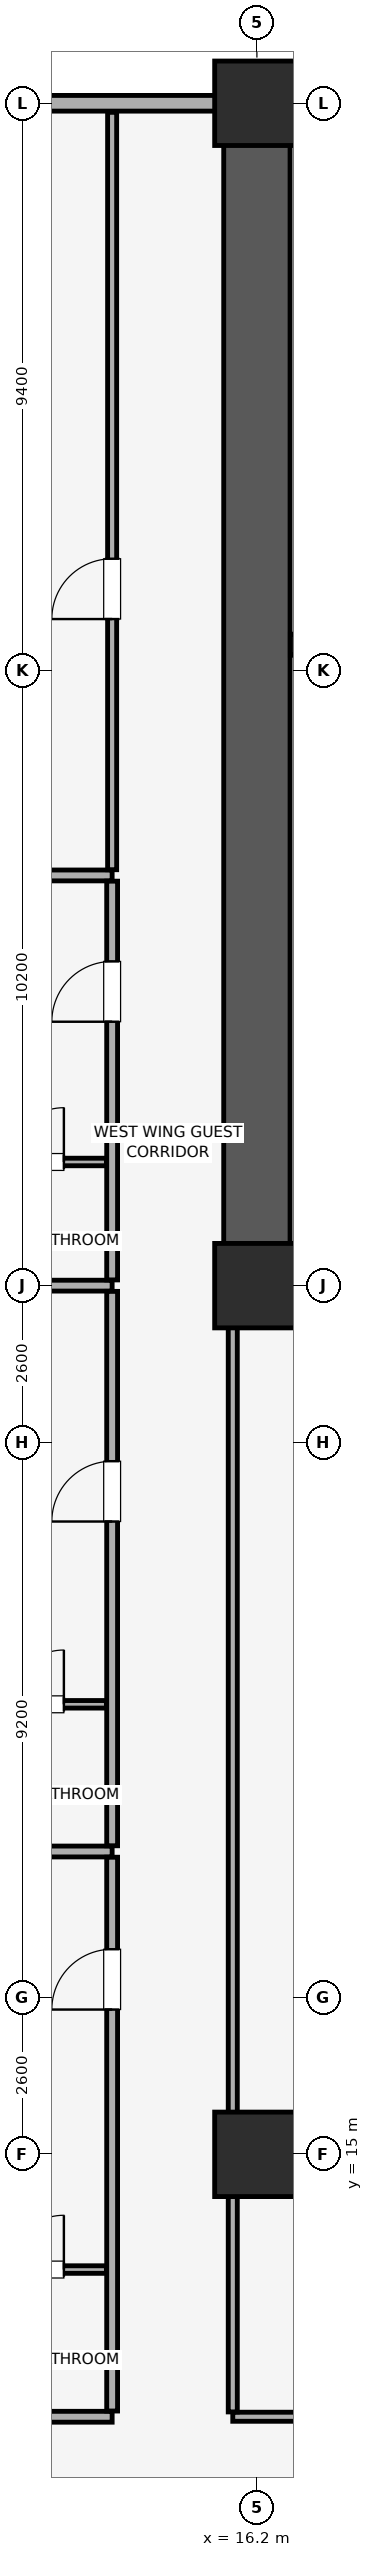
"""IFC4 building model, lengths in metres.
Left out: names, types, materials, properties, quantities, classifications, styles, units other than length and angle.
Written with IfcOpenShell. Run it as: python <this file> out.ifc"""

import sys

from ifc_helpers import new_model, si_unit, direction, frame, frame_2d, origin, origin_2d, place, context, subcontext, project, spatial, rectangle, extrude, element, fill, save


model = new_model("IFC4")
c1 = context("Model", 3, precision=1e-05, world=origin(), true_north=direction((0.0, 1.0)))
c2 = subcontext(c1, "Body", "Model", "MODEL_VIEW")
j1 = project(units=[si_unit("LENGTHUNIT", "METRE"), si_unit("PLANEANGLEUNIT", "RADIAN")], contexts=[c1])
p1 = place(None, origin())
s1 = spatial("IfcSite", under=j1, at=p1, CompositionType="ELEMENT")
p2 = place(p1, origin())
s2 = spatial("IfcBuilding", under=s1, at=p2, CompositionType="ELEMENT")
p3 = place(p2, frame((0.0, 0.0, 35.15)))
s3 = spatial("IfcBuildingStorey", under=s2, at=p3, CompositionType="ELEMENT", Elevation=35.15)
for number, where, z_axis, x_axis in (
    (1, (16.2, 15.0, 0.0), (0.0, 0.0, 1.0), (1.0, 0.0, 0.0)),
    (2, (16.2, 29.4, 0.0), (0.0, 0.0, 1.0), (1.0, 0.0, 0.0)),
    (3, (16.2, 49.0, 0.0), (0.0, 0.0, 1.0), (1.0, 0.0, 0.0)),
):
    element("IfcColumn", number, at=place(p3, frame(where, z_axis=z_axis, x_axis=x_axis)), inside=s3, PredefinedType="COLUMN", context=c2, shape_type="SweptSolid", body=[
        extrude(rectangle(XDim=1.4, YDim=1.4, at=origin_2d()), origin(), (0.0, 0.0, 1.0), 3.51),
    ])
p4 = place(p3, frame((79.8, 49.0, 0.0), z_axis=(0.0, 0.0, 1.0), x_axis=(-1.0, 0.0, 0.0)))
e4 = element("IfcWall", 4, at=p4, inside=s3, PredefinedType="SOLIDWALL", context=c2, shape_type="SweptSolid", body=[
    extrude(rectangle(XDim=75.6, YDim=0.26, at=frame_2d((37.8, 0.0))), origin(), (0.0, 0.0, 1.0), 2.56),
])
p5 = place(p4, frame((72.565, 0.0, 0.85)))
e5 = element("IfcOpeningElement", 5, at=p5, cuts=e4, PredefinedType="OPENING", context=c2, shape_type="SweptSolid", body=[
    extrude(rectangle(XDim=1.5, YDim=1.4, at=frame_2d((0.75, 0.7))), frame((0.0, 0.14, 0.0), z_axis=(0.0, -1.0, 0.0), x_axis=(1.0, 0.0, 0.0)), (0.0, 0.0, 1.0), 0.28),
])
p6 = place(p4, frame((67.45, 0.0, 0.85)))
e6 = element("IfcOpeningElement", 6, at=p6, cuts=e4, PredefinedType="OPENING", context=c2, shape_type="SweptSolid", body=[
    extrude(rectangle(XDim=1.5, YDim=1.4, at=frame_2d((0.75, 0.7))), frame((0.0, 0.14, 0.0), z_axis=(0.0, -1.0, 0.0), x_axis=(1.0, 0.0, 0.0)), (0.0, 0.0, 1.0), 0.28),
])
p7 = place(p4, frame((6.65, 0.0, 0.85)))
e7 = element("IfcOpeningElement", 7, at=p7, cuts=e4, PredefinedType="OPENING", context=c2, shape_type="SweptSolid", body=[
    extrude(rectangle(XDim=1.5, YDim=1.4, at=frame_2d((0.75, 0.7))), frame((0.0, 0.14, 0.0), z_axis=(0.0, -1.0, 0.0), x_axis=(1.0, 0.0, 0.0)), (0.0, 0.0, 1.0), 0.28),
])
p8 = place(p4, frame((1.535, 0.0, 0.85)))
e8 = element("IfcOpeningElement", 8, at=p8, cuts=e4, PredefinedType="OPENING", context=c2, shape_type="SweptSolid", body=[
    extrude(rectangle(XDim=1.5, YDim=1.4, at=frame_2d((0.75, 0.7))), frame((0.0, 0.14, 0.0), z_axis=(0.0, -1.0, 0.0), x_axis=(1.0, 0.0, 0.0)), (0.0, 0.0, 1.0), 0.28),
])
p9 = place(p4, frame((51.365, 0.0, 0.9)))
e9 = element("IfcOpeningElement", 9, at=p9, cuts=e4, PredefinedType="OPENING", context=c2, shape_type="SweptSolid", body=[
    extrude(rectangle(XDim=1.5, YDim=1.4, at=frame_2d((0.75, 0.7))), frame((0.0, 0.14, 0.0), z_axis=(0.0, -1.0, 0.0), x_axis=(1.0, 0.0, 0.0)), (0.0, 0.0, 1.0), 0.28),
])
p10 = place(p4, frame((46.0, 0.0, 0.9)))
e10 = element("IfcOpeningElement", 10, at=p10, cuts=e4, PredefinedType="OPENING", context=c2, shape_type="SweptSolid", body=[
    extrude(rectangle(XDim=1.5, YDim=1.4, at=frame_2d((0.75, 0.7))), frame((0.0, 0.14, 0.0), z_axis=(0.0, -1.0, 0.0), x_axis=(1.0, 0.0, 0.0)), (0.0, 0.0, 1.0), 0.28),
])
p11 = place(p4, frame((29.15, 0.0, 0.9)))
e11 = element("IfcOpeningElement", 11, at=p11, cuts=e4, PredefinedType="OPENING", context=c2, shape_type="SweptSolid", body=[
    extrude(rectangle(XDim=1.5, YDim=1.4, at=frame_2d((0.75, 0.7))), frame((0.0, 0.14, 0.0), z_axis=(0.0, -1.0, 0.0), x_axis=(1.0, 0.0, 0.0)), (0.0, 0.0, 1.0), 0.28),
])
p12 = place(p4, frame((23.485, 0.0, 0.9)))
e12 = element("IfcOpeningElement", 12, at=p12, cuts=e4, PredefinedType="OPENING", context=c2, shape_type="SweptSolid", body=[
    extrude(rectangle(XDim=1.5, YDim=1.4, at=frame_2d((0.75, 0.7))), frame((0.0, 0.14, 0.0), z_axis=(0.0, -1.0, 0.0), x_axis=(1.0, 0.0, 0.0)), (0.0, 0.0, 1.0), 0.28),
])
p13 = place(p3, frame((16.2, 29.4, 0.0), z_axis=(0.0, 0.0, 1.0), x_axis=(0.0, 1.0, 0.0)))
e13 = element("IfcWall", 13, at=p13, inside=s3, PredefinedType="SHEAR", context=c2, shape_type="SweptSolid", body=[
    extrude(rectangle(XDim=19.2, YDim=1.1, at=frame_2d((9.6, 0.0))), origin(), (0.0, 0.0, 1.0), 3.51),
])
p14 = place(p3, frame((16.755, 29.4, 0.0), z_axis=(0.0, 0.0, 1.0), x_axis=(1.0, 0.0, 0.0)))
e14 = element("IfcWall", 14, at=p14, inside=s3, PredefinedType="SHEAR", context=c2, shape_type="SweptSolid", body=[
    extrude(rectangle(XDim=6.845, YDim=1.1, at=frame_2d((3.423, 0.0))), origin(), (0.0, 0.0, 1.0), 3.51),
])
p15 = place(p3, frame((16.755, 40.025, 0.0), z_axis=(0.0, 0.0, 1.0), x_axis=(1.0, 0.0, 0.0)))
e15 = element("IfcWall", 15, at=p15, inside=s3, PredefinedType="SHEAR", context=c2, shape_type="SweptSolid", body=[
    extrude(rectangle(XDim=4.1, YDim=0.35, at=frame_2d((2.05, 0.0))), origin(), (0.0, 0.0, 1.0), 3.51),
])
p16 = place(p15, frame((1.71, 0.0, 0.0)))
e16 = element("IfcOpeningElement", 16, at=p16, cuts=e15, PredefinedType="OPENING", context=c2, shape_type="SweptSolid", body=[
    extrude(rectangle(XDim=1.15, YDim=2.15, at=frame_2d((0.575, 1.075))), frame((0.0, 0.185, 0.0), z_axis=(0.0, -1.0, 0.0), x_axis=(1.0, 0.0, 0.0)), (0.0, 0.0, 1.0), 0.37),
])
p17 = place(p3, frame((15.8, 10.65, 0.0), z_axis=(0.0, 0.0, 1.0), x_axis=(1.0, 0.0, 0.0)))
e17 = element("IfcWall", 17, at=p17, inside=s3, PredefinedType="PARTITIONING", context=c2, shape_type="SweptSolid", body=[
    extrude(rectangle(XDim=9.4, YDim=0.15, at=frame_2d((4.7, 0.0))), origin(), (0.0, 0.0, 1.0), 3.51),
])
p18 = place(p17, frame((4.2, 0.0, 0.0)))
e18 = element("IfcOpeningElement", 18, at=p18, cuts=e17, PredefinedType="OPENING", context=c2, shape_type="SweptSolid", body=[
    extrude(rectangle(XDim=1.0, YDim=2.15, at=frame_2d((0.5, 1.075))), frame((0.0, 0.085, 0.0), z_axis=(0.0, -1.0, 0.0), x_axis=(1.0, 0.0, 0.0)), (0.0, 0.0, 1.0), 0.17),
])
p19 = place(p3, frame((15.8, 10.73, 0.0), z_axis=(0.0, 0.0, 1.0), x_axis=(0.0, 1.0, 0.0)))
e19 = element("IfcWall", 19, at=p19, inside=s3, PredefinedType="PARTITIONING", context=c2, shape_type="SweptSolid", body=[
    extrude(rectangle(XDim=18.66, YDim=0.15, at=frame_2d((9.33, 0.0))), origin(), (0.0, 0.0, 1.0), 3.51),
])
for number, where, z_axis, x_axis in (
    (20, (0.15, 10.65, 0.0), (0.0, 0.0, 1.0), (1.0, 0.0, 0.0)),
    (21, (0.15, 20.02, 0.0), (0.0, 0.0, 1.0), (1.0, 0.0, 0.0)),
):
    element("IfcWall", number, at=place(p3, frame(where, z_axis=z_axis, x_axis=x_axis)), inside=s3, PredefinedType="PARTITIONING", context=c2, shape_type="SweptSolid", body=[
        extrude(rectangle(XDim=13.65, YDim=0.18, at=frame_2d((6.825, 0.0))), origin(), (0.0, 0.0, 1.0), 3.51),
    ])
p20 = place(p3, frame((13.8, 10.745, 0.0), z_axis=(0.0, 0.0, 1.0), x_axis=(0.0, 1.0, 0.0)))
e22 = element("IfcWall", 22, at=p20, inside=s3, PredefinedType="PARTITIONING", context=c2, shape_type="SweptSolid", body=[
    extrude(rectangle(XDim=9.18, YDim=0.18, at=frame_2d((4.59, 0.0))), origin(), (0.0, 0.0, 1.0), 3.51),
])
p21 = place(p20, frame((6.655, 0.0, 0.0)))
e23 = element("IfcOpeningElement", 23, at=p21, cuts=e22, PredefinedType="OPENING", context=c2, shape_type="SweptSolid", body=[
    extrude(rectangle(XDim=1.0, YDim=2.15, at=frame_2d((0.5, 1.075))), frame((0.0, 0.1, 0.0), z_axis=(0.0, -1.0, 0.0), x_axis=(1.0, 0.0, 0.0)), (0.0, 0.0, 1.0), 0.2),
])
p22 = place(p3, frame((11.3, 13.09, 0.0), z_axis=(0.0, 0.0, 1.0), x_axis=(1.0, 0.0, 0.0)))
e24 = element("IfcWall", 24, at=p22, inside=s3, PredefinedType="PARTITIONING", context=c2, shape_type="SweptSolid", body=[
    extrude(rectangle(XDim=2.405, YDim=0.125, at=frame_2d((1.203, 0.0))), origin(), (0.0, 0.0, 1.0), 3.51),
])
p23 = place(p22, frame((0.8, 0.0, 0.0)))
e25 = element("IfcOpeningElement", 25, at=p23, cuts=e24, PredefinedType="OPENING", context=c2, shape_type="SweptSolid", body=[
    extrude(rectangle(XDim=0.9, YDim=2.1, at=frame_2d((0.45, 1.05))), frame((0.0, 0.073, 0.0), z_axis=(0.0, -1.0, 0.0), x_axis=(1.0, 0.0, 0.0)), (0.0, 0.0, 1.0), 0.145),
])
p24 = place(p3, frame((0.15, 29.4, 0.0), z_axis=(0.0, 0.0, 1.0), x_axis=(1.0, 0.0, 0.0)))
e26 = element("IfcWall", 26, at=p24, inside=s3, PredefinedType="PARTITIONING", context=c2, shape_type="SweptSolid", body=[
    extrude(rectangle(XDim=13.65, YDim=0.18, at=frame_2d((6.825, 0.0))), origin(), (0.0, 0.0, 1.0), 2.86),
])
p25 = place(p3, frame((13.8, 20.115, 0.0), z_axis=(0.0, 0.0, 1.0), x_axis=(0.0, 1.0, 0.0)))
e27 = element("IfcWall", 27, at=p25, inside=s3, PredefinedType="PARTITIONING", context=c2, shape_type="SweptSolid", body=[
    extrude(rectangle(XDim=9.19, YDim=0.18, at=frame_2d((4.595, 0.0))), origin(), (0.0, 0.0, 1.0), 3.51),
])
p26 = place(p25, frame((5.375, 0.0, 0.0)))
e28 = element("IfcOpeningElement", 28, at=p26, cuts=e27, PredefinedType="OPENING", context=c2, shape_type="SweptSolid", body=[
    extrude(rectangle(XDim=1.0, YDim=2.15, at=frame_2d((0.5, 1.075))), frame((0.0, 0.1, 0.0), z_axis=(0.0, -1.0, 0.0), x_axis=(1.0, 0.0, 0.0)), (0.0, 0.0, 1.0), 0.2),
])
p27 = place(p3, frame((11.3, 22.46, 0.0), z_axis=(0.0, 0.0, 1.0), x_axis=(1.0, 0.0, 0.0)))
e29 = element("IfcWall", 29, at=p27, inside=s3, PredefinedType="PARTITIONING", context=c2, shape_type="SweptSolid", body=[
    extrude(rectangle(XDim=2.405, YDim=0.125, at=frame_2d((1.203, 0.0))), origin(), (0.0, 0.0, 1.0), 3.51),
])
p28 = place(p27, frame((0.8, 0.0, 0.0)))
e30 = element("IfcOpeningElement", 30, at=p28, cuts=e29, PredefinedType="OPENING", context=c2, shape_type="SweptSolid", body=[
    extrude(rectangle(XDim=0.9, YDim=2.1, at=frame_2d((0.45, 1.05))), frame((0.0, 0.073, 0.0), z_axis=(0.0, -1.0, 0.0), x_axis=(1.0, 0.0, 0.0)), (0.0, 0.0, 1.0), 0.145),
])
p29 = place(p3, frame((0.15, 36.2, 0.0), z_axis=(0.0, 0.0, 1.0), x_axis=(1.0, 0.0, 0.0)))
e31 = element("IfcWall", 31, at=p29, inside=s3, PredefinedType="PARTITIONING", context=c2, shape_type="SweptSolid", body=[
    extrude(rectangle(XDim=13.65, YDim=0.18, at=frame_2d((6.825, 0.0))), origin(), (0.0, 0.0, 1.0), 3.51),
])
p30 = place(p3, frame((13.8, 29.495, 0.0), z_axis=(0.0, 0.0, 1.0), x_axis=(0.0, 1.0, 0.0)))
e32 = element("IfcWall", 32, at=p30, inside=s3, PredefinedType="PARTITIONING", context=c2, shape_type="SweptSolid", body=[
    extrude(rectangle(XDim=6.61, YDim=0.18, at=frame_2d((3.305, 0.0))), origin(), (0.0, 0.0, 1.0), 3.51),
])
p31 = place(p30, frame((4.28, 0.0, 0.0)))
e33 = element("IfcOpeningElement", 33, at=p31, cuts=e32, PredefinedType="OPENING", context=c2, shape_type="SweptSolid", body=[
    extrude(rectangle(XDim=1.0, YDim=2.15, at=frame_2d((0.5, 1.075))), frame((0.0, 0.1, 0.0), z_axis=(0.0, -1.0, 0.0), x_axis=(1.0, 0.0, 0.0)), (0.0, 0.0, 1.0), 0.2),
])
p32 = place(p3, frame((11.3, 31.45, 0.0), z_axis=(0.0, 0.0, 1.0), x_axis=(1.0, 0.0, 0.0)))
e34 = element("IfcWall", 34, at=p32, inside=s3, PredefinedType="PARTITIONING", context=c2, shape_type="SweptSolid", body=[
    extrude(rectangle(XDim=2.405, YDim=0.125, at=frame_2d((1.203, 0.0))), origin(), (0.0, 0.0, 1.0), 3.51),
])
p33 = place(p32, frame((0.8, 0.0, 0.0)))
e35 = element("IfcOpeningElement", 35, at=p33, cuts=e34, PredefinedType="OPENING", context=c2, shape_type="SweptSolid", body=[
    extrude(rectangle(XDim=0.9, YDim=2.1, at=frame_2d((0.45, 1.05))), frame((0.0, 0.073, 0.0), z_axis=(0.0, -1.0, 0.0), x_axis=(1.0, 0.0, 0.0)), (0.0, 0.0, 1.0), 0.145),
])
p34 = place(p3, frame((13.8, 36.295, 0.0), z_axis=(0.0, 0.0, 1.0), x_axis=(0.0, 1.0, 0.0)))
e36 = element("IfcWall", 36, at=p34, inside=s3, PredefinedType="PARTITIONING", context=c2, shape_type="SweptSolid", body=[
    extrude(rectangle(XDim=12.555, YDim=0.15, at=frame_2d((6.278, 0.0))), origin(), (0.0, 0.0, 1.0), 3.51),
])
p35 = place(p34, frame((4.155, 0.0, 0.0)))
e37 = element("IfcOpeningElement", 37, at=p35, cuts=e36, PredefinedType="OPENING", context=c2, shape_type="SweptSolid", body=[
    extrude(rectangle(XDim=1.0, YDim=2.15, at=frame_2d((0.5, 1.075))), frame((0.0, 0.085, 0.0), z_axis=(0.0, -1.0, 0.0), x_axis=(1.0, 0.0, 0.0)), (0.0, 0.0, 1.0), 0.17),
])
p36 = place(p21, origin())
e38 = element("IfcDoor", 38, at=p36, inside=s3, OperationType="SINGLE_SWING_LEFT", PredefinedType="DOOR", context=c2, shape_type="SweptSolid", body=[
    extrude(rectangle(XDim=1.0, YDim=2.15, at=frame_2d((0.5, 1.075))), frame((0.0, 0.025, 0.0), z_axis=(0.0, -1.0, 0.0), x_axis=(1.0, 0.0, 0.0)), (0.0, 0.0, 1.0), 0.05),
])
fill(e23, e38)
p37 = place(p23, origin())
e39 = element("IfcDoor", 39, at=p37, inside=s3, OperationType="SINGLE_SWING_RIGHT", PredefinedType="DOOR", context=c2, shape_type="SweptSolid", body=[
    extrude(rectangle(XDim=0.9, YDim=2.1, at=frame_2d((0.45, 1.05))), frame((0.0, 0.025, 0.0), z_axis=(0.0, -1.0, 0.0), x_axis=(1.0, 0.0, 0.0)), (0.0, 0.0, 1.0), 0.05),
])
fill(e25, e39)
p38 = place(p26, origin())
e40 = element("IfcDoor", 40, at=p38, inside=s3, OperationType="SINGLE_SWING_LEFT", PredefinedType="DOOR", context=c2, shape_type="SweptSolid", body=[
    extrude(rectangle(XDim=1.0, YDim=2.15, at=frame_2d((0.5, 1.075))), frame((0.0, 0.025, 0.0), z_axis=(0.0, -1.0, 0.0), x_axis=(1.0, 0.0, 0.0)), (0.0, 0.0, 1.0), 0.05),
])
fill(e28, e40)
p39 = place(p28, origin())
e41 = element("IfcDoor", 41, at=p39, inside=s3, OperationType="SINGLE_SWING_RIGHT", PredefinedType="DOOR", context=c2, shape_type="SweptSolid", body=[
    extrude(rectangle(XDim=0.9, YDim=2.1, at=frame_2d((0.45, 1.05))), frame((0.0, 0.025, 0.0), z_axis=(0.0, -1.0, 0.0), x_axis=(1.0, 0.0, 0.0)), (0.0, 0.0, 1.0), 0.05),
])
fill(e30, e41)
p40 = place(p31, origin())
e42 = element("IfcDoor", 42, at=p40, inside=s3, OperationType="SINGLE_SWING_LEFT", PredefinedType="DOOR", context=c2, shape_type="SweptSolid", body=[
    extrude(rectangle(XDim=1.0, YDim=2.15, at=frame_2d((0.5, 1.075))), frame((0.0, 0.025, 0.0), z_axis=(0.0, -1.0, 0.0), x_axis=(1.0, 0.0, 0.0)), (0.0, 0.0, 1.0), 0.05),
])
fill(e33, e42)
p41 = place(p33, origin())
e43 = element("IfcDoor", 43, at=p41, inside=s3, OperationType="SINGLE_SWING_RIGHT", PredefinedType="DOOR", context=c2, shape_type="SweptSolid", body=[
    extrude(rectangle(XDim=0.9, YDim=2.1, at=frame_2d((0.45, 1.05))), frame((0.0, 0.025, 0.0), z_axis=(0.0, -1.0, 0.0), x_axis=(1.0, 0.0, 0.0)), (0.0, 0.0, 1.0), 0.05),
])
fill(e35, e43)
p42 = place(p35, origin())
e44 = element("IfcDoor", 44, at=p42, inside=s3, OperationType="SINGLE_SWING_LEFT", PredefinedType="DOOR", context=c2, shape_type="SweptSolid", body=[
    extrude(rectangle(XDim=1.0, YDim=2.15, at=frame_2d((0.5, 1.075))), frame((0.0, 0.025, 0.0), z_axis=(0.0, -1.0, 0.0), x_axis=(1.0, 0.0, 0.0)), (0.0, 0.0, 1.0), 0.05),
])
fill(e37, e44)
save(model, sys.argv[1])
